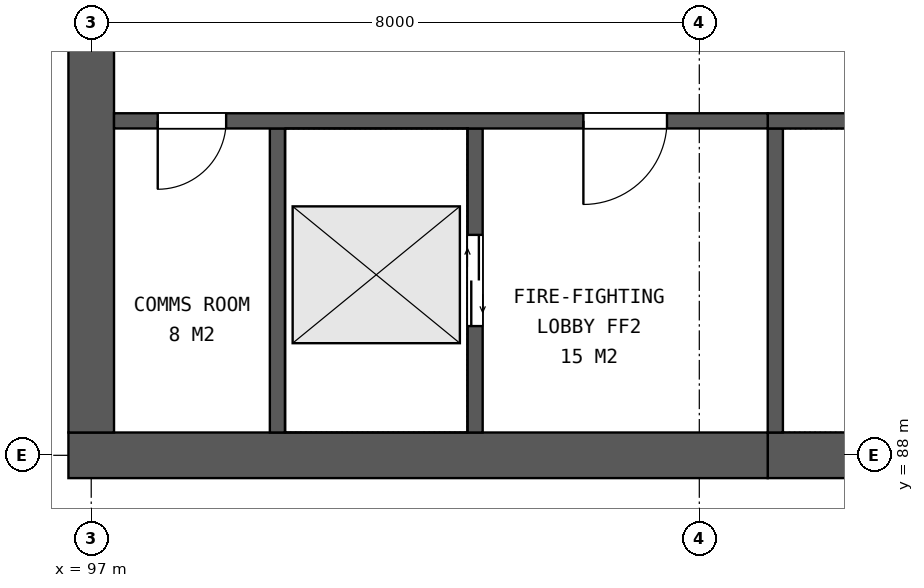
"""IFC4 building model, lengths in metres.
Left out: names, types, materials, properties, quantities, classifications, styles, units other than length and angle.
Written with IfcOpenShell. Run it as: python <this file> out.ifc"""

import sys

from ifc_helpers import new_model, si_unit, direction, frame, frame_2d, origin, place, context, subcontext, project, spatial, rectangle, extrude, element, fill, save


model = new_model("IFC4")
c1 = context("Model", 3, precision=1e-05, world=origin(), true_north=direction((0.0, 1.0)))
c2 = subcontext(c1, "Body", "Model", "MODEL_VIEW")
j1 = project(units=[si_unit("LENGTHUNIT", "METRE"), si_unit("PLANEANGLEUNIT", "RADIAN")], contexts=[c1])
p1 = place(None, origin())
s1 = spatial("IfcSite", under=j1, at=p1, CompositionType="ELEMENT")
p2 = place(p1, origin())
s2 = spatial("IfcBuilding", under=s1, at=p2, CompositionType="ELEMENT")
p3 = place(p2, frame((0.0, 0.0, 233.5)))
s3 = spatial("IfcBuildingStorey", under=s2, at=p3, CompositionType="ELEMENT", Elevation=233.5)
p4 = place(p3, frame((113.0, 88.0, 0.0), z_axis=(0.0, 0.0, 1.0), x_axis=(-1.0, 0.0, 0.0)))
e1 = element("IfcWall", 1, at=p4, inside=s3, PredefinedType="SHEAR", context=c2, shape_type="SweptSolid", body=[
    extrude(rectangle(XDim=7.1, YDim=0.6, at=frame_2d((3.55, 0.0))), origin(), (0.0, 0.0, 1.0), 4.2),
])
p5 = place(p3, frame((105.9, 88.0, 0.0), z_axis=(0.0, 0.0, 1.0), x_axis=(-1.0, 0.0, 0.0)))
e2 = element("IfcWall", 2, at=p5, inside=s3, PredefinedType="SHEAR", context=c2, shape_type="SweptSolid", body=[
    extrude(rectangle(XDim=9.2, YDim=0.6, at=frame_2d((4.6, 0.0))), origin(), (0.0, 0.0, 1.0), 4.2),
])
p6 = place(p3, frame((97.0, 111.7, 0.0), z_axis=(0.0, 0.0, 1.0), x_axis=(0.0, -1.0, 0.0)))
e3 = element("IfcWall", 3, at=p6, inside=s3, PredefinedType="SHEAR", context=c2, shape_type="SweptSolid", body=[
    extrude(rectangle(XDim=23.4, YDim=0.6, at=frame_2d((11.7, 0.0))), origin(), (0.0, 0.0, 1.0), 4.2),
])
p7 = place(p6, frame((9.9, 0.0, 0.15)))
e4 = element("IfcOpeningElement", 4, at=p7, cuts=e3, PredefinedType="OPENING", context=c2, shape_type="SweptSolid", body=[
    extrude(rectangle(XDim=3.6, YDim=3.0, at=frame_2d((1.8, 1.5))), frame((0.0, 0.31, 0.0), z_axis=(0.0, -1.0, 0.0), x_axis=(1.0, 0.0, 0.0)), (0.0, 0.0, 1.0), 0.62),
])
p8 = place(p3, frame((106.0, 92.3, 0.0), z_axis=(0.0, 0.0, 1.0), x_axis=(0.0, -1.0, 0.0)))
e5 = element("IfcWall", 5, at=p8, inside=s3, PredefinedType="SHEAR", context=c2, shape_type="SweptSolid", body=[
    extrude(rectangle(XDim=4.0, YDim=0.2, at=frame_2d((2.0, 0.0))), origin(), (0.0, 0.0, 1.0), 4.2),
])
p9 = place(p3, frame((102.05, 92.3, 0.0), z_axis=(0.0, 0.0, 1.0), x_axis=(0.0, -1.0, 0.0)))
e6 = element("IfcWall", 6, at=p9, inside=s3, PredefinedType="SHEAR", context=c2, shape_type="SweptSolid", body=[
    extrude(rectangle(XDim=4.0, YDim=0.2, at=frame_2d((2.0, 0.0))), origin(), (0.0, 0.0, 1.0), 4.2),
])
p10 = place(p9, frame((1.4, 0.0, 0.0)))
e7 = element("IfcOpeningElement", 7, at=p10, cuts=e6, PredefinedType="OPENING", context=c2, shape_type="SweptSolid", body=[
    extrude(rectangle(XDim=1.2, YDim=2.1, at=frame_2d((0.6, 1.05))), frame((0.0, 0.11, 0.0), z_axis=(0.0, -1.0, 0.0), x_axis=(1.0, 0.0, 0.0)), (0.0, 0.0, 1.0), 0.22),
])
p11 = place(p3, frame((99.45, 92.3, 0.0), z_axis=(0.0, 0.0, 1.0), x_axis=(0.0, -1.0, 0.0)))
e8 = element("IfcWall", 8, at=p11, inside=s3, PredefinedType="SHEAR", context=c2, shape_type="SweptSolid", body=[
    extrude(rectangle(XDim=4.0, YDim=0.2, at=frame_2d((2.0, 0.0))), origin(), (0.0, 0.0, 1.0), 4.2),
])
p12 = place(p3, frame((112.7, 92.4, 0.0), z_axis=(0.0, 0.0, 1.0), x_axis=(-1.0, 0.0, 0.0)))
e9 = element("IfcWall", 9, at=p12, inside=s3, PredefinedType="SHEAR", context=c2, shape_type="SweptSolid", body=[
    extrude(rectangle(XDim=6.8, YDim=0.2, at=frame_2d((3.4, 0.0))), origin(), (0.0, 0.0, 1.0), 4.2),
])
p13 = place(p12, frame((0.15, 0.0, 0.0)))
e10 = element("IfcOpeningElement", 10, at=p13, cuts=e9, PredefinedType="OPENING", context=c2, shape_type="SweptSolid", body=[
    extrude(rectangle(XDim=1.0, YDim=2.1, at=frame_2d((0.5, 1.05))), frame((0.0, 0.11, 0.0), z_axis=(0.0, -1.0, 0.0), x_axis=(1.0, 0.0, 0.0)), (0.0, 0.0, 1.0), 0.22),
])
p14 = place(p3, frame((105.9, 92.4, 0.0), z_axis=(0.0, 0.0, 1.0), x_axis=(-1.0, 0.0, 0.0)))
e11 = element("IfcWall", 11, at=p14, inside=s3, PredefinedType="SHEAR", context=c2, shape_type="SweptSolid", body=[
    extrude(rectangle(XDim=8.6, YDim=0.2, at=frame_2d((4.3, 0.0))), origin(), (0.0, 0.0, 1.0), 4.2),
])
p15 = place(p14, frame((1.325, 0.0, 0.0)))
e12 = element("IfcOpeningElement", 12, at=p15, cuts=e11, PredefinedType="OPENING", context=c2, shape_type="SweptSolid", body=[
    extrude(rectangle(XDim=1.1, YDim=2.1, at=frame_2d((0.55, 1.05))), frame((0.0, 0.11, 0.0), z_axis=(0.0, -1.0, 0.0), x_axis=(1.0, 0.0, 0.0)), (0.0, 0.0, 1.0), 0.22),
])
p16 = place(p14, frame((7.125, 0.0, 0.0)))
e13 = element("IfcOpeningElement", 13, at=p16, cuts=e11, PredefinedType="OPENING", context=c2, shape_type="SweptSolid", body=[
    extrude(rectangle(XDim=0.9, YDim=2.1, at=frame_2d((0.45, 1.05))), frame((0.0, 0.11, 0.0), z_axis=(0.0, -1.0, 0.0), x_axis=(1.0, 0.0, 0.0)), (0.0, 0.0, 1.0), 0.22),
])
p17 = place(p10, origin())
e14 = element("IfcDoor", 14, at=p17, inside=s3, OperationType="DOUBLE_DOOR_SLIDING", PredefinedType="DOOR", context=c2, shape_type="SweptSolid", body=[
    extrude(rectangle(XDim=1.2, YDim=2.1, at=frame_2d((0.6, 1.05))), frame((0.0, 0.025, 0.0), z_axis=(0.0, -1.0, 0.0), x_axis=(1.0, 0.0, 0.0)), (0.0, 0.0, 1.0), 0.05),
])
fill(e7, e14)
p18 = place(p15, origin())
e15 = element("IfcDoor", 15, at=p18, inside=s3, OperationType="SINGLE_SWING_RIGHT", PredefinedType="DOOR", context=c2, shape_type="SweptSolid", body=[
    extrude(rectangle(XDim=1.1, YDim=2.1, at=frame_2d((0.55, 1.05))), frame((0.0, 0.025, 0.0), z_axis=(0.0, -1.0, 0.0), x_axis=(1.0, 0.0, 0.0)), (0.0, 0.0, 1.0), 0.05),
])
fill(e12, e15)
p19 = place(p16, origin())
e16 = element("IfcDoor", 16, at=p19, inside=s3, OperationType="SINGLE_SWING_RIGHT", PredefinedType="DOOR", context=c2, shape_type="SweptSolid", body=[
    extrude(rectangle(XDim=0.9, YDim=2.1, at=frame_2d((0.45, 1.05))), frame((0.0, 0.025, 0.0), z_axis=(0.0, -1.0, 0.0), x_axis=(1.0, 0.0, 0.0)), (0.0, 0.0, 1.0), 0.05),
])
fill(e13, e16)
save(model, sys.argv[1])
